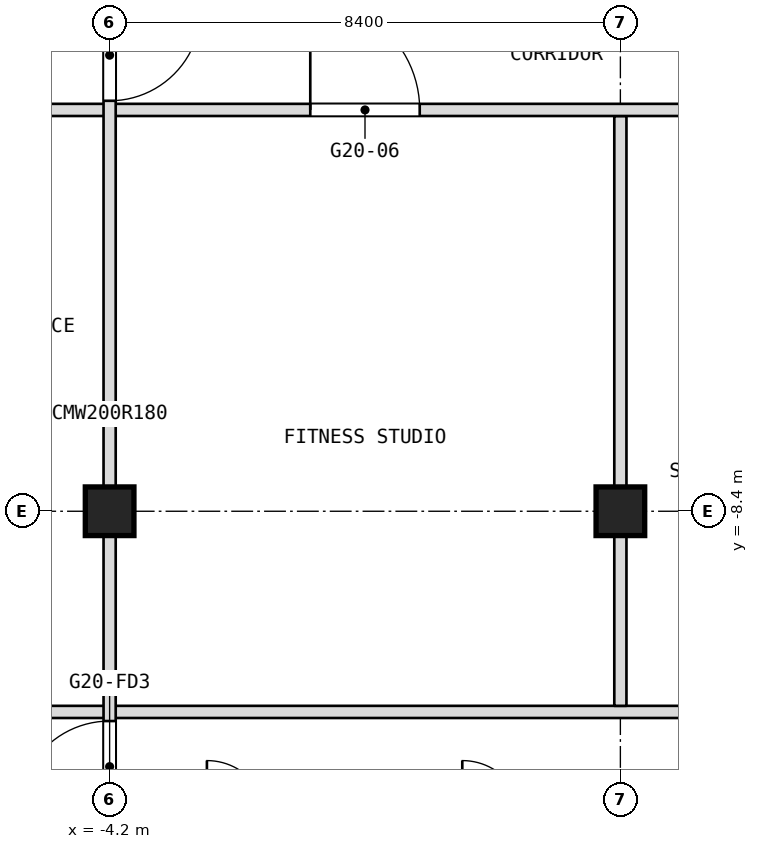
"""IFC4 building model, lengths in metres.
Left out: names, types, materials, properties, quantities, classifications, styles, units other than length and angle.
Written with IfcOpenShell. Run it as: python <this file> out.ifc"""

import sys

from ifc_helpers import new_model, si_unit, direction, frame, frame_2d, origin, origin_2d, place, context, subcontext, project, spatial, rectangle, extrude, element, fill, save


model = new_model("IFC4")
c1 = context("Model", 3, precision=1e-05, world=origin(), true_north=direction((0.0, 1.0)))
c2 = subcontext(c1, "Body", "Model", "MODEL_VIEW")
j1 = project(units=[si_unit("LENGTHUNIT", "METRE"), si_unit("PLANEANGLEUNIT", "RADIAN")], contexts=[c1])
p1 = place(None, origin())
s1 = spatial("IfcSite", under=j1, at=p1, CompositionType="ELEMENT")
p2 = place(p1, origin())
s2 = spatial("IfcBuilding", under=s1, at=p2, CompositionType="ELEMENT")
p3 = place(p2, frame((0.0, 0.0, 230.9)))
s3 = spatial("IfcBuildingStorey", under=s2, at=p3, CompositionType="ELEMENT", Elevation=230.9)
for number, where, z_axis, x_axis in (
    (1, (-4.2, -8.4, 0.0), (0.0, 0.0, 1.0), (1.0, 0.0, 0.0)),
    (2, (4.2, -8.4, 0.0), (0.0, 0.0, 1.0), (1.0, 0.0, 0.0)),
):
    element("IfcColumn", number, at=place(p3, frame(where, z_axis=z_axis, x_axis=x_axis)), inside=s3, PredefinedType="COLUMN", context=c2, shape_type="SweptSolid", body=[
        extrude(rectangle(XDim=0.8, YDim=0.8, at=origin_2d()), origin(), (0.0, 0.0, 1.0), 3.6),
    ])
p4 = place(p3, frame((-7.3, -11.7, 0.0), z_axis=(0.0, 0.0, 1.0), x_axis=(1.0, 0.0, 0.0)))
e3 = element("IfcWall", 3, at=p4, inside=s3, PredefinedType="PARTITIONING", context=c2, shape_type="SweptSolid", body=[
    extrude(rectangle(XDim=14.6, YDim=0.2, at=frame_2d((7.3, 0.0))), origin(), (0.0, 0.0, 1.0), 3.34),
])
p5 = place(p3, frame((4.2, -11.6, 0.0), z_axis=(0.0, 0.0, 1.0), x_axis=(0.0, 1.0, 0.0)))
e4 = element("IfcWall", 4, at=p5, inside=s3, PredefinedType="PARTITIONING", context=c2, shape_type="SweptSolid", body=[
    extrude(rectangle(XDim=9.7, YDim=0.2, at=frame_2d((4.85, 0.0))), origin(), (0.0, 0.0, 1.0), 3.34),
])
p6 = place(p3, frame((-16.9, -1.8, 0.0), z_axis=(0.0, 0.0, 1.0), x_axis=(1.0, 0.0, 0.0)))
e5 = element("IfcWall", 5, at=p6, inside=s3, PredefinedType="PARTITIONING", context=c2, shape_type="SweptSolid", body=[
    extrude(rectangle(XDim=33.8, YDim=0.2, at=frame_2d((16.9, 0.0))), origin(), (0.0, 0.0, 1.0), 3.34),
])
p7 = place(p6, frame((1.7, 0.0, 0.0)))
e6 = element("IfcOpeningElement", 6, at=p7, cuts=e5, PredefinedType="OPENING", context=c2, shape_type="SweptSolid", body=[
    extrude(rectangle(XDim=1.0, YDim=2.1, at=frame_2d((0.5, 1.05))), frame((0.0, 0.1, 0.0), z_axis=(0.0, -1.0, 0.0), x_axis=(1.0, 0.0, 0.0)), (0.0, 0.0, 1.0), 0.2),
])
p8 = place(p6, frame((5.9, 0.0, 0.0)))
e7 = element("IfcOpeningElement", 7, at=p8, cuts=e5, PredefinedType="OPENING", context=c2, shape_type="SweptSolid", body=[
    extrude(rectangle(XDim=1.0, YDim=2.1, at=frame_2d((0.5, 1.05))), frame((0.0, 0.1, 0.0), z_axis=(0.0, -1.0, 0.0), x_axis=(1.0, 0.0, 0.0)), (0.0, 0.0, 1.0), 0.2),
])
p9 = place(p6, frame((10.1, 0.0, 0.0)))
e8 = element("IfcOpeningElement", 8, at=p9, cuts=e5, PredefinedType="OPENING", context=c2, shape_type="SweptSolid", body=[
    extrude(rectangle(XDim=1.0, YDim=2.1, at=frame_2d((0.5, 1.05))), frame((0.0, 0.1, 0.0), z_axis=(0.0, -1.0, 0.0), x_axis=(1.0, 0.0, 0.0)), (0.0, 0.0, 1.0), 0.2),
])
p10 = place(p6, frame((16.0, 0.0, 0.0)))
e9 = element("IfcOpeningElement", 9, at=p10, cuts=e5, PredefinedType="OPENING", context=c2, shape_type="SweptSolid", body=[
    extrude(rectangle(XDim=1.8, YDim=2.1, at=frame_2d((0.9, 1.05))), frame((0.0, 0.1, 0.0), z_axis=(0.0, -1.0, 0.0), x_axis=(1.0, 0.0, 0.0)), (0.0, 0.0, 1.0), 0.2),
])
p11 = place(p6, frame((22.7, 0.0, 0.0)))
e10 = element("IfcOpeningElement", 10, at=p11, cuts=e5, PredefinedType="OPENING", context=c2, shape_type="SweptSolid", body=[
    extrude(rectangle(XDim=1.0, YDim=2.1, at=frame_2d((0.5, 1.05))), frame((0.0, 0.1, 0.0), z_axis=(0.0, -1.0, 0.0), x_axis=(1.0, 0.0, 0.0)), (0.0, 0.0, 1.0), 0.2),
])
p12 = place(p6, frame((26.9, 0.0, 0.0)))
e11 = element("IfcOpeningElement", 11, at=p12, cuts=e5, PredefinedType="OPENING", context=c2, shape_type="SweptSolid", body=[
    extrude(rectangle(XDim=1.0, YDim=2.1, at=frame_2d((0.5, 1.05))), frame((0.0, 0.1, 0.0), z_axis=(0.0, -1.0, 0.0), x_axis=(1.0, 0.0, 0.0)), (0.0, 0.0, 1.0), 0.2),
])
p13 = place(p6, frame((31.1, 0.0, 0.0)))
e12 = element("IfcOpeningElement", 12, at=p13, cuts=e5, PredefinedType="OPENING", context=c2, shape_type="SweptSolid", body=[
    extrude(rectangle(XDim=1.0, YDim=2.1, at=frame_2d((0.5, 1.05))), frame((0.0, 0.1, 0.0), z_axis=(0.0, -1.0, 0.0), x_axis=(1.0, 0.0, 0.0)), (0.0, 0.0, 1.0), 0.2),
])
p14 = place(p3, frame((-4.2, -13.6, 0.0), z_axis=(0.0, 0.0, 1.0), x_axis=(0.0, 1.0, 0.0)))
e13 = element("IfcWall", 13, at=p14, inside=s3, PredefinedType="PARTITIONING", context=c2, shape_type="SweptSolid", body=[
    extrude(rectangle(XDim=13.6, YDim=0.2, at=frame_2d((6.8, 0.0))), origin(), (0.0, 0.0, 1.0), 3.34),
])
p15 = place(p14, frame((11.95, 0.0, 0.0)))
e14 = element("IfcOpeningElement", 14, at=p15, cuts=e13, PredefinedType="OPENING", context=c2, shape_type="SweptSolid", body=[
    extrude(rectangle(XDim=1.5, YDim=2.1, at=frame_2d((0.75, 1.05))), frame((0.0, 0.1, 0.0), z_axis=(0.0, -1.0, 0.0), x_axis=(1.0, 0.0, 0.0)), (0.0, 0.0, 1.0), 0.2),
])
p16 = place(p14, frame((0.25, 0.0, 0.0)))
e15 = element("IfcOpeningElement", 15, at=p16, cuts=e13, PredefinedType="OPENING", context=c2, shape_type="SweptSolid", body=[
    extrude(rectangle(XDim=1.5, YDim=2.1, at=frame_2d((0.75, 1.05))), frame((0.0, 0.1, 0.0), z_axis=(0.0, -1.0, 0.0), x_axis=(1.0, 0.0, 0.0)), (0.0, 0.0, 1.0), 0.2),
])
p17 = place(p10, origin())
e16 = element("IfcDoor", 16, at=p17, inside=s3, OperationType="DOUBLE_DOOR_SINGLE_SWING", PredefinedType="DOOR", context=c2, shape_type="SweptSolid", body=[
    extrude(rectangle(XDim=1.8, YDim=2.1, at=frame_2d((0.9, 1.05))), frame((0.0, 0.025, 0.0), z_axis=(0.0, -1.0, 0.0), x_axis=(1.0, 0.0, 0.0)), (0.0, 0.0, 1.0), 0.05),
])
fill(e9, e16)
p18 = place(p15, origin())
e17 = element("IfcDoor", 17, at=p18, inside=s3, OperationType="DOUBLE_DOOR_DOUBLE_SWING", PredefinedType="DOOR", context=c2, shape_type="SweptSolid", body=[
    extrude(rectangle(XDim=1.5, YDim=2.1, at=frame_2d((0.75, 1.05))), frame((0.0, 0.025, 0.0), z_axis=(0.0, -1.0, 0.0), x_axis=(1.0, 0.0, 0.0)), (0.0, 0.0, 1.0), 0.05),
])
fill(e14, e17)
p19 = place(p16, origin())
e18 = element("IfcDoor", 18, at=p19, inside=s3, OperationType="DOUBLE_DOOR_DOUBLE_SWING", PredefinedType="DOOR", context=c2, shape_type="SweptSolid", body=[
    extrude(rectangle(XDim=1.5, YDim=2.1, at=frame_2d((0.75, 1.05))), frame((0.0, 0.025, 0.0), z_axis=(0.0, -1.0, 0.0), x_axis=(1.0, 0.0, 0.0)), (0.0, 0.0, 1.0), 0.05),
])
fill(e15, e18)
save(model, sys.argv[1])
